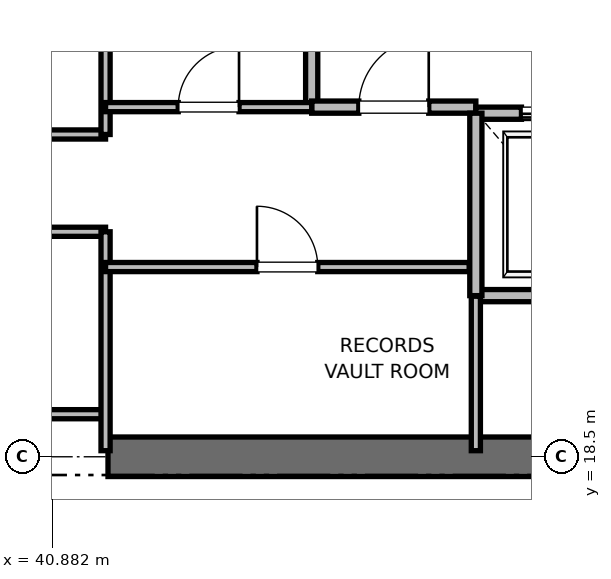
"""IFC4 building model, lengths in metres.
Left out: names, types, materials, properties, quantities, classifications, styles, units other than length and angle.
Written with IfcOpenShell. Run it as: python <this file> out.ifc"""

import sys

from ifc_helpers import new_model, si_unit, direction, frame, frame_2d, origin, place, context, subcontext, project, spatial, rectangle, extrude, element, fill, save


model = new_model("IFC4")
c1 = context("Model", 3, precision=1e-05, world=origin(), true_north=direction((0.0, 1.0)))
c2 = subcontext(c1, "Body", "Model", "MODEL_VIEW")
j1 = project(units=[si_unit("LENGTHUNIT", "METRE"), si_unit("PLANEANGLEUNIT", "RADIAN")], contexts=[c1])
p1 = place(None, origin())
s1 = spatial("IfcSite", under=j1, at=p1, CompositionType="ELEMENT")
p2 = place(p1, origin())
s2 = spatial("IfcBuilding", under=s1, at=p2, CompositionType="ELEMENT")
p3 = place(p2, frame((0.0, 0.0, 67.6)))
s3 = spatial("IfcBuildingStorey", under=s2, at=p3, CompositionType="ELEMENT", Elevation=67.6)
p4 = place(p3, frame((41.8, 18.5, 0.0), z_axis=(0.0, 0.0, 1.0), x_axis=(1.0, 0.0, 0.0)))
e1 = element("IfcWall", 1, at=p4, inside=s3, PredefinedType="SHEAR", context=c2, shape_type="SweptSolid", body=[
    extrude(rectangle(XDim=9.2, YDim=0.65, at=frame_2d((4.6, 0.0))), origin(), (0.0, 0.0, 1.0), 3.76),
])
p5 = place(p3, frame((45.15, 24.25, 0.0), z_axis=(0.0, 0.0, 1.0), x_axis=(0.0, 1.0, 0.0)))
e2 = element("IfcWall", 2, at=p5, inside=s3, PredefinedType="PARTITIONING", context=c2, shape_type="SweptSolid", body=[
    extrude(rectangle(XDim=3.37, YDim=0.2, at=frame_2d((1.685, 0.0))), origin(), (0.0, 0.0, 1.0), 3.76),
])
p6 = place(p3, frame((45.15, 24.25, 0.0), z_axis=(0.0, 0.0, 1.0), x_axis=(1.0, 0.0, 0.0)))
e3 = element("IfcWall", 3, at=p6, inside=s3, PredefinedType="PARTITIONING", context=c2, shape_type="SweptSolid", body=[
    extrude(rectangle(XDim=2.7, YDim=0.2, at=frame_2d((1.35, 0.0))), origin(), (0.0, 0.0, 1.0), 3.76),
])
p7 = place(p6, frame((0.775, 0.0, 0.0)))
e4 = element("IfcOpeningElement", 4, at=p7, cuts=e3, PredefinedType="OPENING", context=c2, shape_type="SweptSolid", body=[
    extrude(rectangle(XDim=1.15, YDim=2.2, at=frame_2d((0.575, 1.1))), frame((0.0, 0.1, 0.0), z_axis=(0.0, -1.0, 0.0), x_axis=(1.0, 0.0, 0.0)), (0.0, 0.0, 1.0), 0.2),
])
p8 = place(p3, frame((47.85, 21.15, 0.0), z_axis=(0.0, 0.0, 1.0), x_axis=(1.0, 0.0, 0.0)))
e5 = element("IfcWall", 5, at=p8, inside=s3, PredefinedType="SOLIDWALL", context=c2, shape_type="SweptSolid", body=[
    extrude(rectangle(XDim=2.6, YDim=0.2, at=frame_2d((1.3, 0.0))), origin(), (0.0, 0.0, 1.0), 3.76),
])
p9 = place(p3, frame((50.45, 24.15, 0.0), z_axis=(0.0, 0.0, 1.0), x_axis=(-1.0, 0.0, 0.0)))
e6 = element("IfcWall", 6, at=p9, inside=s3, PredefinedType="SOLIDWALL", context=c2, shape_type="SweptSolid", body=[
    extrude(rectangle(XDim=2.6, YDim=0.2, at=frame_2d((1.3, 0.0))), origin(), (0.0, 0.0, 1.0), 2.54),
])
p10 = place(p9, frame((0.75, 0.0, 0.0)))
e7 = element("IfcOpeningElement", 7, at=p10, cuts=e6, PredefinedType="OPENING", context=c2, shape_type="SweptSolid", body=[
    extrude(rectangle(XDim=1.1, YDim=2.2, at=frame_2d((0.55, 1.1))), frame((0.0, 0.1, 0.0), z_axis=(0.0, -1.0, 0.0), x_axis=(1.0, 0.0, 0.0)), (0.0, 0.0, 1.0), 0.2),
])
p11 = place(p3, frame((47.85, 24.15, 0.0), z_axis=(0.0, 0.0, 1.0), x_axis=(0.0, -1.0, 0.0)))
e8 = element("IfcWall", 8, at=p11, inside=s3, PredefinedType="SOLIDWALL", context=c2, shape_type="SweptSolid", body=[
    extrude(rectangle(XDim=3.0, YDim=0.2, at=frame_2d((1.5, 0.0))), origin(), (0.0, 0.0, 1.0), 3.76),
])
for number, where, z_axis, x_axis in (
    (9, (39.95, 19.2, 0.0), (0.0, 0.0, 1.0), (1.0, 0.0, 0.0)),
    (10, (39.95, 22.2, 0.0), (0.0, 0.0, 1.0), (1.0, 0.0, 0.0)),
    (11, (39.95, 23.8, 0.0), (0.0, 0.0, 1.0), (1.0, 0.0, 0.0)),
):
    element("IfcWall", number, at=place(p3, frame(where, z_axis=z_axis, x_axis=x_axis)), inside=s3, PredefinedType="PARTITIONING", context=c2, shape_type="SweptSolid", body=[
        extrude(rectangle(XDim=1.81, YDim=0.15, at=frame_2d((0.905, 0.0))), origin(), (0.0, 0.0, 1.0), 2.85),
    ])
p12 = place(p3, frame((41.76, 18.6, 0.0), z_axis=(0.0, 0.0, 1.0), x_axis=(0.0, 1.0, 0.0)))
e12 = element("IfcWall", 12, at=p12, inside=s3, PredefinedType="PARTITIONING", context=c2, shape_type="SweptSolid", body=[
    extrude(rectangle(XDim=3.6, YDim=0.15, at=frame_2d((1.8, 0.0))), origin(), (0.0, 0.0, 1.0), 2.54),
])
p13 = place(p3, frame((41.76, 23.8, 0.0), z_axis=(0.0, 0.0, 1.0), x_axis=(0.0, 1.0, 0.0)))
e13 = element("IfcWall", 13, at=p13, inside=s3, PredefinedType="PARTITIONING", context=c2, shape_type="SweptSolid", body=[
    extrude(rectangle(XDim=4.0, YDim=0.15, at=frame_2d((2.0, 0.0))), origin(), (0.0, 0.0, 1.0), 2.85),
])
p14 = place(p3, frame((47.85, 18.6, 0.0), z_axis=(0.0, 0.0, 1.0), x_axis=(0.0, 1.0, 0.0)))
e14 = element("IfcWall", 14, at=p14, inside=s3, PredefinedType="PARTITIONING", context=c2, shape_type="SweptSolid", body=[
    extrude(rectangle(XDim=2.54, YDim=0.15, at=frame_2d((1.27, 0.0))), origin(), (0.0, 0.0, 1.0), 2.85),
])
p15 = place(p3, frame((41.76, 21.62, 0.0), z_axis=(0.0, 0.0, 1.0), x_axis=(1.0, 0.0, 0.0)))
e15 = element("IfcWall", 15, at=p15, inside=s3, PredefinedType="PARTITIONING", context=c2, shape_type="SweptSolid", body=[
    extrude(rectangle(XDim=5.98, YDim=0.15, at=frame_2d((2.99, 0.0))), origin(), (0.0, 0.0, 1.0), 2.85),
])
p16 = place(p15, frame((2.49, 0.0, 0.0)))
e16 = element("IfcOpeningElement", 16, at=p16, cuts=e15, PredefinedType="OPENING", context=c2, shape_type="SweptSolid", body=[
    extrude(rectangle(XDim=1.0, YDim=2.15, at=frame_2d((0.5, 1.075))), frame((0.0, 0.075, 0.0), z_axis=(0.0, -1.0, 0.0), x_axis=(1.0, 0.0, 0.0)), (0.0, 0.0, 1.0), 0.15),
])
p17 = place(p3, frame((41.76, 24.25, 0.0), z_axis=(0.0, 0.0, 1.0), x_axis=(1.0, 0.0, 0.0)))
e17 = element("IfcWall", 17, at=p17, inside=s3, PredefinedType="PARTITIONING", context=c2, shape_type="SweptSolid", body=[
    extrude(rectangle(XDim=3.39, YDim=0.15, at=frame_2d((1.695, 0.0))), origin(), (0.0, 0.0, 1.0), 2.85),
])
p18 = place(p17, frame((1.195, 0.0, 0.0)))
e18 = element("IfcOpeningElement", 18, at=p18, cuts=e17, PredefinedType="OPENING", context=c2, shape_type="SweptSolid", body=[
    extrude(rectangle(XDim=1.0, YDim=2.15, at=frame_2d((0.5, 1.075))), frame((0.0, 0.075, 0.0), z_axis=(0.0, -1.0, 0.0), x_axis=(1.0, 0.0, 0.0)), (0.0, 0.0, 1.0), 0.15),
])
p19 = place(p7, origin())
e19 = element("IfcDoor", 19, at=p19, inside=s3, OperationType="SINGLE_SWING_RIGHT", PredefinedType="DOOR", context=c2, shape_type="SweptSolid", body=[
    extrude(rectangle(XDim=1.15, YDim=2.2, at=frame_2d((0.575, 1.1))), frame((0.0, 0.025, 0.0), z_axis=(0.0, -1.0, 0.0), x_axis=(1.0, 0.0, 0.0)), (0.0, 0.0, 1.0), 0.05),
])
fill(e4, e19)
p20 = place(p10, origin())
e20 = element("IfcDoor", 20, at=p20, inside=s3, OperationType="SLIDING_TO_RIGHT", PredefinedType="DOOR", context=c2, shape_type="SweptSolid", body=[
    extrude(rectangle(XDim=1.1, YDim=2.2, at=frame_2d((0.55, 1.1))), frame((0.0, 0.025, 0.0), z_axis=(0.0, -1.0, 0.0), x_axis=(1.0, 0.0, 0.0)), (0.0, 0.0, 1.0), 0.05),
])
fill(e7, e20)
p21 = place(p16, origin())
e21 = element("IfcDoor", 21, at=p21, inside=s3, OperationType="SINGLE_SWING_LEFT", PredefinedType="DOOR", context=c2, shape_type="SweptSolid", body=[
    extrude(rectangle(XDim=1.0, YDim=2.15, at=frame_2d((0.5, 1.075))), frame((0.0, 0.025, 0.0), z_axis=(0.0, -1.0, 0.0), x_axis=(1.0, 0.0, 0.0)), (0.0, 0.0, 1.0), 0.05),
])
fill(e16, e21)
p22 = place(p18, origin())
e22 = element("IfcDoor", 22, at=p22, inside=s3, OperationType="SINGLE_SWING_RIGHT", PredefinedType="DOOR", context=c2, shape_type="SweptSolid", body=[
    extrude(rectangle(XDim=1.0, YDim=2.15, at=frame_2d((0.5, 1.075))), frame((0.0, 0.025, 0.0), z_axis=(0.0, -1.0, 0.0), x_axis=(1.0, 0.0, 0.0)), (0.0, 0.0, 1.0), 0.05),
])
fill(e18, e22)
save(model, sys.argv[1])
